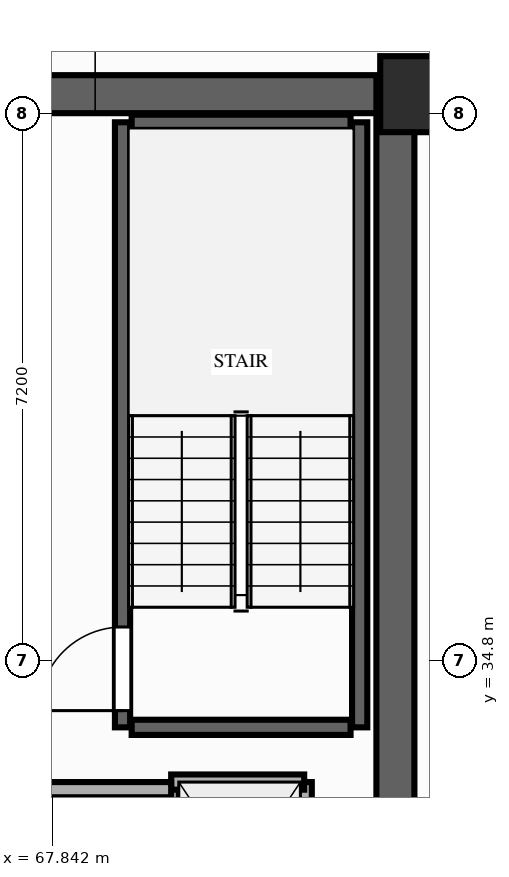
"""IFC4 building model, lengths in metres.
Left out: names, types, materials, properties, quantities, classifications, styles, units other than length and angle.
Written with IfcOpenShell. Run it as: python <this file> out.ifc"""

import sys

from ifc_helpers import new_model, si_unit, direction, frame, frame_2d, origin, origin_2d, place, context, subcontext, project, spatial, rectangle, extrude, element, fill, save


model = new_model("IFC4")
c1 = context("Model", 3, precision=1e-05, world=origin(), true_north=direction((0.0, 1.0)))
c2 = subcontext(c1, "Body", "Model", "MODEL_VIEW")
j1 = project(units=[si_unit("LENGTHUNIT", "METRE"), si_unit("PLANEANGLEUNIT", "RADIAN")], contexts=[c1])
p1 = place(None, origin())
s1 = spatial("IfcSite", under=j1, at=p1, CompositionType="ELEMENT")
p2 = place(p1, origin())
s2 = spatial("IfcBuilding", under=s1, at=p2, CompositionType="ELEMENT")
p3 = place(p2, frame((0.0, 0.0, 72.4)))
s3 = spatial("IfcBuildingStorey", under=s2, at=p3, CompositionType="ELEMENT", Elevation=72.4)
p4 = place(p3, frame((72.65, 42.25, 0.0), z_axis=(0.0, 0.0, 1.0), x_axis=(1.0, 0.0, 0.0)))
e1 = element("IfcColumn", 1, at=p4, inside=s3, PredefinedType="COLUMN", context=c2, shape_type="SweptSolid", body=[
    extrude(rectangle(XDim=1.0, YDim=1.0, at=origin_2d()), origin(), (0.0, 0.0, 1.0), 3.2),
])
p5 = place(p3, frame((72.35, 22.0, 0.0), z_axis=(0.0, 0.0, 1.0), x_axis=(0.0, 1.0, 0.0)))
e2 = element("IfcWall", 2, at=p5, inside=s3, PredefinedType="SHEAR", context=c2, shape_type="SweptSolid", body=[
    extrude(rectangle(XDim=20.25, YDim=0.5, at=frame_2d((10.125, 0.0))), origin(), (0.0, 0.0, 1.0), 2.96),
])
p6 = place(p3, frame((64.6, 42.25, 0.0), z_axis=(0.0, 0.0, 1.0), x_axis=(1.0, 0.0, 0.0)))
e3 = element("IfcWall", 3, at=p6, inside=s3, PredefinedType="SHEAR", context=c2, shape_type="SweptSolid", body=[
    extrude(rectangle(XDim=7.5, YDim=0.5, at=frame_2d((3.75, 0.0))), origin(), (0.0, 0.0, 1.0), 2.96),
])
p7 = place(p3, frame((68.76, 33.92, 0.0), z_axis=(0.0, 0.0, 1.0), x_axis=(0.0, 1.0, 0.0)))
e4 = element("IfcWall", 4, at=p7, inside=s3, PredefinedType="SHEAR", context=c2, shape_type="SweptSolid", body=[
    extrude(rectangle(XDim=7.96, YDim=0.2, at=frame_2d((3.98, 0.0))), origin(), (0.0, 0.0, 1.0), 2.96),
])
p8 = place(p7, frame((0.22, 0.0, 0.0)))
e5 = element("IfcOpeningElement", 5, at=p8, cuts=e4, PredefinedType="OPENING", context=c2, shape_type="SweptSolid", body=[
    extrude(rectangle(XDim=1.1, YDim=2.15, at=frame_2d((0.55, 1.075))), frame((0.0, 0.11, 0.0), z_axis=(0.0, -1.0, 0.0), x_axis=(1.0, 0.0, 0.0)), (0.0, 0.0, 1.0), 0.22),
])
p9 = place(p3, frame((71.88, 33.92, 0.0), z_axis=(0.0, 0.0, 1.0), x_axis=(0.0, 1.0, 0.0)))
e6 = element("IfcWall", 6, at=p9, inside=s3, PredefinedType="SHEAR", context=c2, shape_type="SweptSolid", body=[
    extrude(rectangle(XDim=7.96, YDim=0.2, at=frame_2d((3.98, 0.0))), origin(), (0.0, 0.0, 1.0), 2.96),
])
for number, where, z_axis, x_axis in (
    (7, (68.88, 41.88, 0.0), (0.0, 0.0, 1.0), (1.0, 0.0, 0.0)),
    (8, (68.88, 33.92, 0.0), (0.0, 0.0, 1.0), (1.0, 0.0, 0.0)),
):
    element("IfcWall", number, at=place(p3, frame(where, z_axis=z_axis, x_axis=x_axis)), inside=s3, PredefinedType="SHEAR", context=c2, shape_type="SweptSolid", body=[
        extrude(rectangle(XDim=2.88, YDim=0.2, at=frame_2d((1.44, 0.0))), origin(), (0.0, 0.0, 1.0), 2.96),
    ])
p10 = place(p3, frame((69.4, 30.75, 0.0), z_axis=(0.0, 0.0, 1.0), x_axis=(0.0, 1.0, 0.0)))
e9 = element("IfcWall", 9, at=p10, inside=s3, PredefinedType="MOVABLE", context=c2, shape_type="SweptSolid", body=[
    extrude(rectangle(XDim=2.45, YDim=0.2, at=frame_2d((1.225, 0.0))), origin(), (0.0, 0.0, 1.0), 2.96),
])
p11 = place(p10, frame((0.65, 0.0, 0.0)))
e10 = element("IfcOpeningElement", 10, at=p11, cuts=e9, PredefinedType="OPENING", context=c2, shape_type="SweptSolid", body=[
    extrude(rectangle(XDim=1.05, YDim=2.15, at=frame_2d((0.525, 1.075))), frame((0.0, 0.11, 0.0), z_axis=(0.0, -1.0, 0.0), x_axis=(1.0, 0.0, 0.0)), (0.0, 0.0, 1.0), 0.22),
])
p12 = place(p3, frame((71.15, 30.75, 0.0), z_axis=(0.0, 0.0, 1.0), x_axis=(0.0, 1.0, 0.0)))
e11 = element("IfcWall", 11, at=p12, inside=s3, PredefinedType="MOVABLE", context=c2, shape_type="SweptSolid", body=[
    extrude(rectangle(XDim=2.45, YDim=0.2, at=frame_2d((1.225, 0.0))), origin(), (0.0, 0.0, 1.0), 2.96),
])
p13 = place(p3, frame((69.4, 33.2, 0.0), z_axis=(0.0, 0.0, 1.0), x_axis=(1.0, 0.0, 0.0)))
e12 = element("IfcWall", 12, at=p13, inside=s3, PredefinedType="MOVABLE", context=c2, shape_type="SweptSolid", body=[
    extrude(rectangle(XDim=1.75, YDim=0.2, at=frame_2d((0.875, 0.0))), origin(), (0.0, 0.0, 1.0), 2.96),
])
p14 = place(p3, frame((65.8, 33.1, 0.0), z_axis=(0.0, 0.0, 1.0), x_axis=(1.0, 0.0, 0.0)))
e13 = element("IfcWall", 13, at=p14, inside=s3, PredefinedType="PARTITIONING", context=c2, shape_type="SweptSolid", body=[
    extrude(rectangle(XDim=3.6, YDim=0.2, at=frame_2d((1.8, 0.0))), origin(), (0.0, 0.0, 1.0), 2.96),
])
p15 = place(p8, origin())
e14 = element("IfcDoor", 14, at=p15, inside=s3, OperationType="SINGLE_SWING_LEFT", PredefinedType="DOOR", context=c2, shape_type="SweptSolid", body=[
    extrude(rectangle(XDim=1.1, YDim=2.15, at=frame_2d((0.55, 1.075))), frame((0.0, 0.025, 0.0), z_axis=(0.0, -1.0, 0.0), x_axis=(1.0, 0.0, 0.0)), (0.0, 0.0, 1.0), 0.05),
])
fill(e5, e14)
save(model, sys.argv[1])
